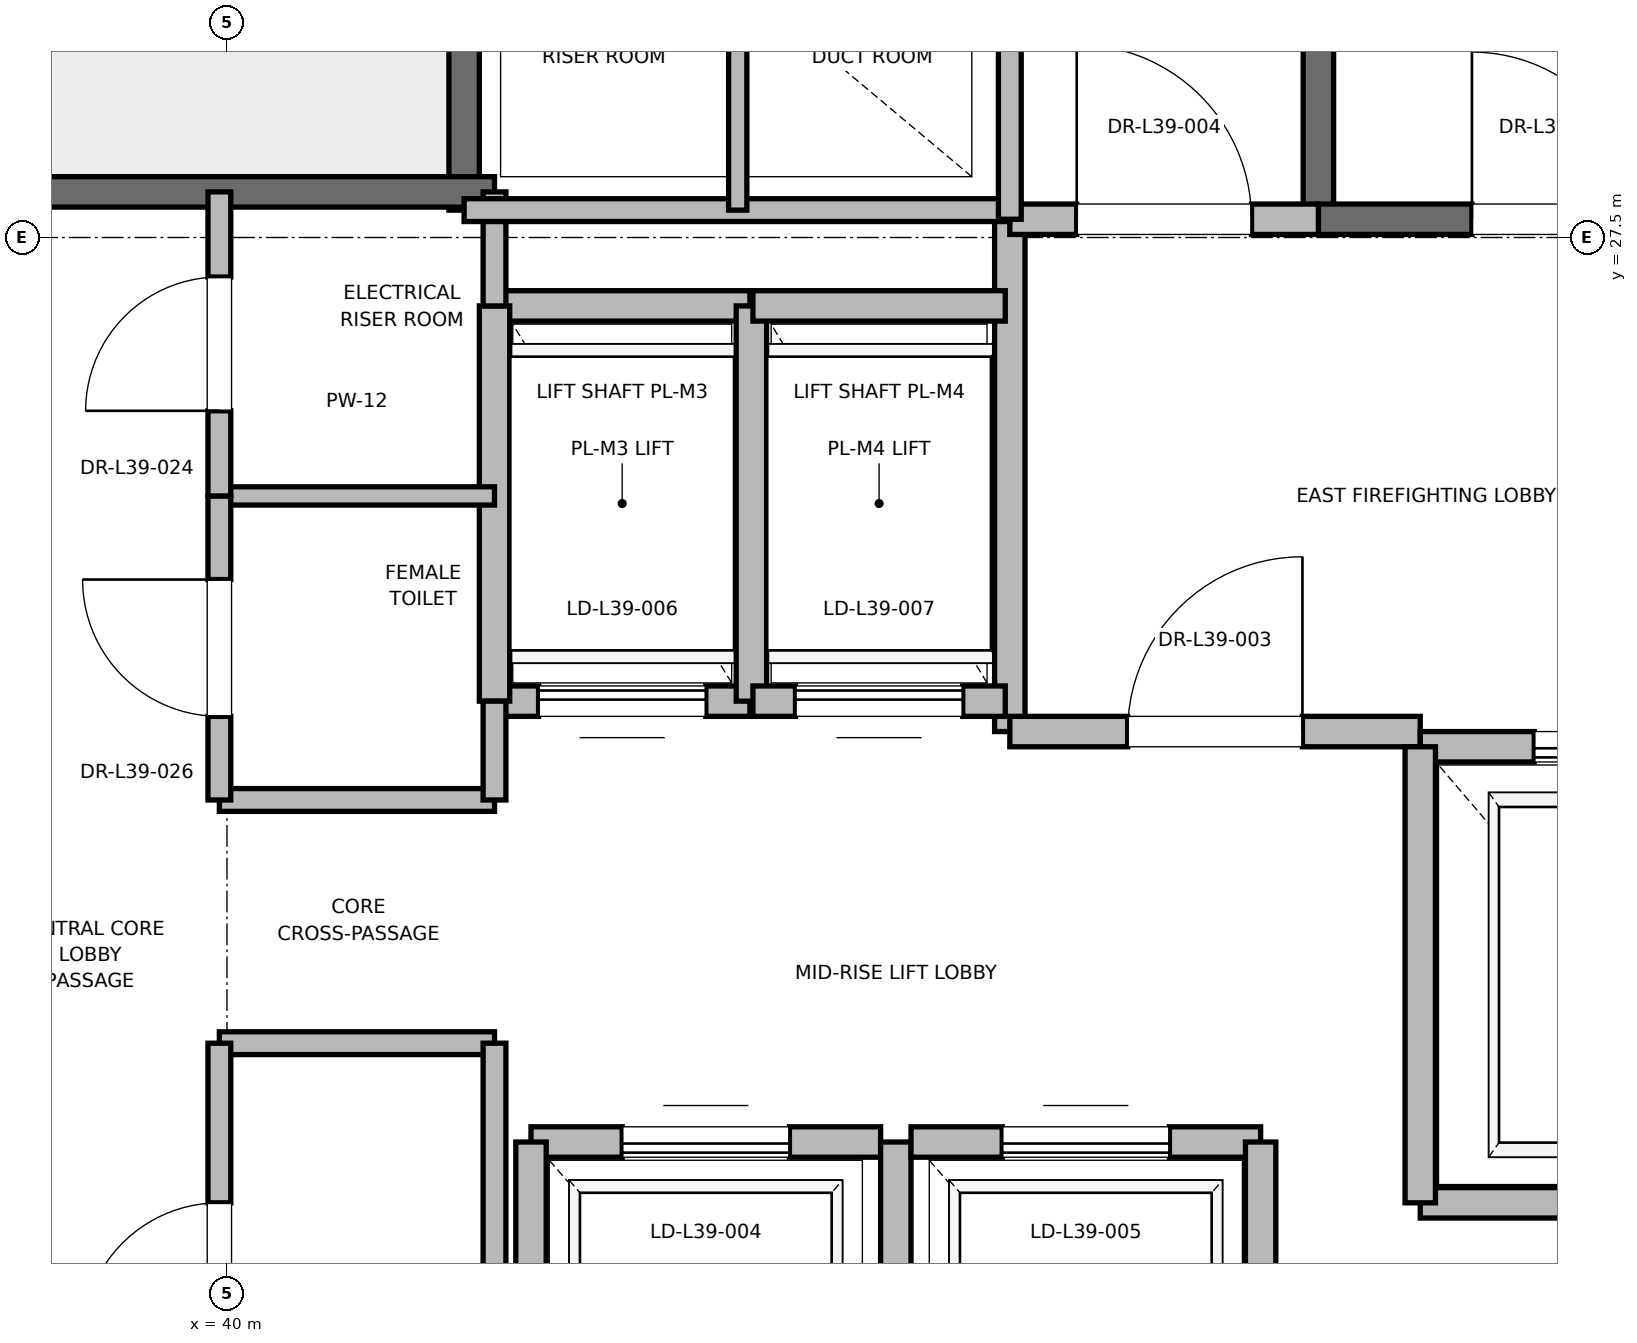
"""IFC4 building model, lengths in metres.
Left out: names, types, materials, properties, quantities, classifications, styles, units other than length and angle.
Written with IfcOpenShell. Run it as: python <this file> out.ifc"""

import sys

from ifc_helpers import new_model, si_unit, direction, frame, frame_2d, origin, place, context, subcontext, project, spatial, rectangle, extrude, element, fill, save


model = new_model("IFC4")
c1 = context("Model", 3, precision=1e-05, world=origin(), true_north=direction((0.0, 1.0)))
c2 = subcontext(c1, "Body", "Model", "MODEL_VIEW")
j1 = project(units=[si_unit("LENGTHUNIT", "METRE"), si_unit("PLANEANGLEUNIT", "RADIAN")], contexts=[c1])
p1 = place(None, origin())
s1 = spatial("IfcSite", under=j1, at=p1, CompositionType="ELEMENT")
p2 = place(p1, origin())
s2 = spatial("IfcBuilding", under=s1, at=p2, CompositionType="ELEMENT")
p3 = place(p2, frame((0.0, 0.0, 168.4)))
s3 = spatial("IfcBuildingStorey", under=s2, at=p3, CompositionType="ELEMENT", Elevation=168.4)
p4 = place(p3, frame((47.18, 27.62, 0.0), z_axis=(0.0, 0.0, 1.0), x_axis=(0.0, 1.0, 0.0)))
e1 = element("IfcWall", 1, at=p4, inside=s3, PredefinedType="SOLIDWALL", context=c2, shape_type="SweptSolid", body=[
    extrude(rectangle(XDim=8.18, YDim=0.2, at=frame_2d((4.09, 0.0))), origin(), (0.0, 0.0, 1.0), 3.775),
])
p5 = place(p3, frame((47.18, 27.62, 0.0), z_axis=(0.0, 0.0, 1.0), x_axis=(1.0, 0.0, 0.0)))
e2 = element("IfcWall", 2, at=p5, inside=s3, PredefinedType="SOLIDWALL", context=c2, shape_type="SweptSolid", body=[
    extrude(rectangle(XDim=3.12, YDim=0.2, at=frame_2d((1.56, 0.0))), origin(), (0.0, 0.0, 1.0), 3.775),
])
p6 = place(p5, frame((1.01, 0.0, 0.0)))
e3 = element("IfcOpeningElement", 3, at=p6, cuts=e2, PredefinedType="OPENING", context=c2, shape_type="SweptSolid", body=[
    extrude(rectangle(XDim=1.1, YDim=2.15, at=frame_2d((0.55, 1.075))), frame((0.0, 0.1, 0.0), z_axis=(0.0, -1.0, 0.0), x_axis=(1.0, 0.0, 0.0)), (0.0, 0.0, 1.0), 0.2),
])
p7 = place(p3, frame((41.56, 27.68, 0.0), z_axis=(0.0, 0.0, 1.0), x_axis=(0.0, 1.0, 0.0)))
e4 = element("IfcWall", 4, at=p7, inside=s3, PredefinedType="SOLIDWALL", context=c2, shape_type="SweptSolid", body=[
    extrude(rectangle(XDim=8.57, YDim=0.2, at=frame_2d((4.285, 0.0))), origin(), (0.0, 0.0, 1.0), 3.775),
])
p8 = place(p3, frame((38.44, 27.8, 0.0), z_axis=(0.0, 0.0, 1.0), x_axis=(1.0, 0.0, 0.0)))
e5 = element("IfcWall", 5, at=p8, inside=s3, PredefinedType="SOLIDWALL", context=c2, shape_type="SweptSolid", body=[
    extrude(rectangle(XDim=3.32, YDim=0.2, at=frame_2d((1.66, 0.0))), origin(), (0.0, 0.0, 1.0), 3.775),
])
p9 = place(p3, frame((45.15, 24.25, 0.0), z_axis=(0.0, 0.0, 1.0), x_axis=(0.0, 1.0, 0.0)))
e6 = element("IfcWall", 6, at=p9, inside=s3, PredefinedType="PARTITIONING", context=c2, shape_type="SweptSolid", body=[
    extrude(rectangle(XDim=3.37, YDim=0.2, at=frame_2d((1.685, 0.0))), origin(), (0.0, 0.0, 1.0), 3.775),
])
p10 = place(p3, frame((45.15, 24.25, 0.0), z_axis=(0.0, 0.0, 1.0), x_axis=(1.0, 0.0, 0.0)))
e7 = element("IfcWall", 7, at=p10, inside=s3, PredefinedType="PARTITIONING", context=c2, shape_type="SweptSolid", body=[
    extrude(rectangle(XDim=2.7, YDim=0.2, at=frame_2d((1.35, 0.0))), origin(), (0.0, 0.0, 1.0), 3.775),
])
p11 = place(p10, frame((0.775, 0.0, 0.0)))
e8 = element("IfcOpeningElement", 8, at=p11, cuts=e7, PredefinedType="OPENING", context=c2, shape_type="SweptSolid", body=[
    extrude(rectangle(XDim=1.15, YDim=2.2, at=frame_2d((0.575, 1.1))), frame((0.0, 0.1, 0.0), z_axis=(0.0, -1.0, 0.0), x_axis=(1.0, 0.0, 0.0)), (0.0, 0.0, 1.0), 0.2),
])
p12 = place(p3, frame((45.15, 27.62, 0.0), z_axis=(0.0, 0.0, 1.0), x_axis=(1.0, 0.0, 0.0)))
e9 = element("IfcWall", 9, at=p12, inside=s3, PredefinedType="PARTITIONING", context=c2, shape_type="SweptSolid", body=[
    extrude(rectangle(XDim=2.03, YDim=0.2, at=frame_2d((1.015, 0.0))), origin(), (0.0, 0.0, 1.0), 3.775),
])
p13 = place(p12, frame((0.44, 0.0, 0.0)))
e10 = element("IfcOpeningElement", 10, at=p13, cuts=e9, PredefinedType="OPENING", context=c2, shape_type="SweptSolid", body=[
    extrude(rectangle(XDim=1.15, YDim=2.2, at=frame_2d((0.575, 1.1))), frame((0.0, 0.1, 0.0), z_axis=(0.0, -1.0, 0.0), x_axis=(1.0, 0.0, 0.0)), (0.0, 0.0, 1.0), 0.2),
])
p14 = place(p3, frame((47.85, 21.15, 0.0), z_axis=(0.0, 0.0, 1.0), x_axis=(1.0, 0.0, 0.0)))
e11 = element("IfcWall", 11, at=p14, inside=s3, PredefinedType="SOLIDWALL", context=c2, shape_type="SweptSolid", body=[
    extrude(rectangle(XDim=2.6, YDim=0.2, at=frame_2d((1.3, 0.0))), origin(), (0.0, 0.0, 1.0), 3.775),
])
p15 = place(p3, frame((50.45, 24.15, 0.0), z_axis=(0.0, 0.0, 1.0), x_axis=(-1.0, 0.0, 0.0)))
e12 = element("IfcWall", 12, at=p15, inside=s3, PredefinedType="SOLIDWALL", context=c2, shape_type="SweptSolid", body=[
    extrude(rectangle(XDim=2.6, YDim=0.2, at=frame_2d((1.3, 0.0))), origin(), (0.0, 0.0, 1.0), 2.755),
])
p16 = place(p15, frame((0.75, 0.0, 0.0)))
e13 = element("IfcOpeningElement", 13, at=p16, cuts=e12, PredefinedType="OPENING", context=c2, shape_type="SweptSolid", body=[
    extrude(rectangle(XDim=1.1, YDim=2.2, at=frame_2d((0.55, 1.1))), frame((0.0, 0.1, 0.0), z_axis=(0.0, -1.0, 0.0), x_axis=(1.0, 0.0, 0.0)), (0.0, 0.0, 1.0), 0.2),
])
p17 = place(p3, frame((47.85, 24.15, 0.0), z_axis=(0.0, 0.0, 1.0), x_axis=(0.0, -1.0, 0.0)))
e14 = element("IfcWall", 14, at=p17, inside=s3, PredefinedType="SOLIDWALL", context=c2, shape_type="SweptSolid", body=[
    extrude(rectangle(XDim=3.0, YDim=0.2, at=frame_2d((1.5, 0.0))), origin(), (0.0, 0.0, 1.0), 3.775),
])
p18 = place(p3, frame((44.3, 21.55, 0.0), z_axis=(0.0, 0.0, 1.0), x_axis=(-1.0, 0.0, 0.0)))
e15 = element("IfcWall", 15, at=p18, inside=s3, PredefinedType="SOLIDWALL", context=c2, shape_type="SweptSolid", body=[
    extrude(rectangle(XDim=2.3, YDim=0.2, at=frame_2d((1.15, 0.0))), origin(), (0.0, 0.0, 1.0), 3.775),
])
p19 = place(p18, frame((0.6, 0.0, 0.0)))
e16 = element("IfcOpeningElement", 16, at=p19, cuts=e15, PredefinedType="OPENING", context=c2, shape_type="SweptSolid", body=[
    extrude(rectangle(XDim=1.1, YDim=2.2, at=frame_2d((0.55, 1.1))), frame((0.0, 0.1, 0.0), z_axis=(0.0, -1.0, 0.0), x_axis=(1.0, 0.0, 0.0)), (0.0, 0.0, 1.0), 0.2),
])
p20 = place(p3, frame((42.0, 21.55, 0.0), z_axis=(0.0, 0.0, 1.0), x_axis=(0.0, -1.0, 0.0)))
e17 = element("IfcWall", 17, at=p20, inside=s3, PredefinedType="SOLIDWALL", context=c2, shape_type="SweptSolid", body=[
    extrude(rectangle(XDim=2.6, YDim=0.2, at=frame_2d((1.3, 0.0))), origin(), (0.0, 0.0, 1.0), 2.755),
])
p21 = place(p3, frame((44.4, 18.95, 0.0), z_axis=(0.0, 0.0, 1.0), x_axis=(0.0, 1.0, 0.0)))
e18 = element("IfcWall", 18, at=p21, inside=s3, PredefinedType="SOLIDWALL", context=c2, shape_type="SweptSolid", body=[
    extrude(rectangle(XDim=2.6, YDim=0.2, at=frame_2d((1.3, 0.0))), origin(), (0.0, 0.0, 1.0), 3.775),
])
p22 = place(p3, frame((46.8, 21.55, 0.0), z_axis=(0.0, 0.0, 1.0), x_axis=(-1.0, 0.0, 0.0)))
e19 = element("IfcWall", 19, at=p22, inside=s3, PredefinedType="SOLIDWALL", context=c2, shape_type="SweptSolid", body=[
    extrude(rectangle(XDim=2.3, YDim=0.2, at=frame_2d((1.15, 0.0))), origin(), (0.0, 0.0, 1.0), 3.775),
])
p23 = place(p22, frame((0.6, 0.0, 0.0)))
e20 = element("IfcOpeningElement", 20, at=p23, cuts=e19, PredefinedType="OPENING", context=c2, shape_type="SweptSolid", body=[
    extrude(rectangle(XDim=1.1, YDim=2.2, at=frame_2d((0.55, 1.1))), frame((0.0, 0.1, 0.0), z_axis=(0.0, -1.0, 0.0), x_axis=(1.0, 0.0, 0.0)), (0.0, 0.0, 1.0), 0.2),
])
p24 = place(p3, frame((46.8, 18.95, 0.0), z_axis=(0.0, 0.0, 1.0), x_axis=(0.0, 1.0, 0.0)))
e21 = element("IfcWall", 21, at=p24, inside=s3, PredefinedType="SOLIDWALL", context=c2, shape_type="SweptSolid", body=[
    extrude(rectangle(XDim=2.6, YDim=0.2, at=frame_2d((1.3, 0.0))), origin(), (0.0, 0.0, 1.0), 3.775),
])
p25 = place(p3, frame((41.76, 24.45, 0.0), z_axis=(0.0, 0.0, 1.0), x_axis=(1.0, 0.0, 0.0)))
e22 = element("IfcWall", 22, at=p25, inside=s3, PredefinedType="SOLIDWALL", context=c2, shape_type="SweptSolid", body=[
    extrude(rectangle(XDim=1.68, YDim=0.2, at=frame_2d((0.84, 0.0))), origin(), (0.0, 0.0, 1.0), 3.775),
])
p26 = place(p25, frame((0.29, 0.0, 0.0)))
e23 = element("IfcOpeningElement", 23, at=p26, cuts=e22, PredefinedType="OPENING", context=c2, shape_type="SweptSolid", body=[
    extrude(rectangle(XDim=1.1, YDim=2.2, at=frame_2d((0.55, 1.1))), frame((0.0, 0.1, 0.0), z_axis=(0.0, -1.0, 0.0), x_axis=(1.0, 0.0, 0.0)), (0.0, 0.0, 1.0), 0.2),
])
p27 = place(p3, frame((43.44, 27.05, 0.0), z_axis=(0.0, 0.0, 1.0), x_axis=(-1.0, 0.0, 0.0)))
e24 = element("IfcWall", 24, at=p27, inside=s3, PredefinedType="SOLIDWALL", context=c2, shape_type="SweptSolid", body=[
    extrude(rectangle(XDim=1.68, YDim=0.2, at=frame_2d((0.84, 0.0))), origin(), (0.0, 0.0, 1.0), 3.775),
])
for number, where, z_axis, x_axis in (
    (25, (41.76, 27.05, 0.0), (0.0, 0.0, 1.0), (0.0, -1.0, 0.0)),
    (26, (43.45, 24.45, 0.0), (0.0, 0.0, 1.0), (0.0, 1.0, 0.0)),
):
    element("IfcWall", number, at=place(p3, frame(where, z_axis=z_axis, x_axis=x_axis)), inside=s3, PredefinedType="SOLIDWALL", context=c2, shape_type="SweptSolid", body=[
        extrude(rectangle(XDim=2.6, YDim=0.2, at=frame_2d((1.3, 0.0))), origin(), (0.0, 0.0, 1.0), 3.775),
    ])
p28 = place(p3, frame((43.46, 24.45, 0.0), z_axis=(0.0, 0.0, 1.0), x_axis=(1.0, 0.0, 0.0)))
e27 = element("IfcWall", 27, at=p28, inside=s3, PredefinedType="SOLIDWALL", context=c2, shape_type="SweptSolid", body=[
    extrude(rectangle(XDim=1.66, YDim=0.2, at=frame_2d((0.83, 0.0))), origin(), (0.0, 0.0, 1.0), 3.775),
])
p29 = place(p28, frame((0.28, 0.0, 0.0)))
e28 = element("IfcOpeningElement", 28, at=p29, cuts=e27, PredefinedType="OPENING", context=c2, shape_type="SweptSolid", body=[
    extrude(rectangle(XDim=1.1, YDim=2.2, at=frame_2d((0.55, 1.1))), frame((0.0, 0.1, 0.0), z_axis=(0.0, -1.0, 0.0), x_axis=(1.0, 0.0, 0.0)), (0.0, 0.0, 1.0), 0.2),
])
p30 = place(p3, frame((45.12, 27.05, 0.0), z_axis=(0.0, 0.0, 1.0), x_axis=(-1.0, 0.0, 0.0)))
e29 = element("IfcWall", 29, at=p30, inside=s3, PredefinedType="SOLIDWALL", context=c2, shape_type="SweptSolid", body=[
    extrude(rectangle(XDim=1.66, YDim=0.2, at=frame_2d((0.83, 0.0))), origin(), (0.0, 0.0, 1.0), 3.775),
])
for number, where, z_axis, x_axis in (
    (30, (39.95, 22.2, 0.0), (0.0, 0.0, 1.0), (1.0, 0.0, 0.0)),
    (31, (39.95, 23.8, 0.0), (0.0, 0.0, 1.0), (1.0, 0.0, 0.0)),
):
    element("IfcWall", number, at=place(p3, frame(where, z_axis=z_axis, x_axis=x_axis)), inside=s3, PredefinedType="PARTITIONING", context=c2, shape_type="SweptSolid", body=[
        extrude(rectangle(XDim=1.81, YDim=0.15, at=frame_2d((0.905, 0.0))), origin(), (0.0, 0.0, 1.0), 2.85),
    ])
p31 = place(p3, frame((39.95, 25.8, 0.0), z_axis=(0.0, 0.0, 1.0), x_axis=(1.0, 0.0, 0.0)))
e32 = element("IfcWall", 32, at=p31, inside=s3, PredefinedType="PARTITIONING", context=c2, shape_type="SweptSolid", body=[
    extrude(rectangle(XDim=1.81, YDim=0.12, at=frame_2d((0.905, 0.0))), origin(), (0.0, 0.0, 1.0), 2.85),
])
p32 = place(p3, frame((41.76, 18.6, 0.0), z_axis=(0.0, 0.0, 1.0), x_axis=(0.0, 1.0, 0.0)))
e33 = element("IfcWall", 33, at=p32, inside=s3, PredefinedType="PARTITIONING", context=c2, shape_type="SweptSolid", body=[
    extrude(rectangle(XDim=3.6, YDim=0.15, at=frame_2d((1.8, 0.0))), origin(), (0.0, 0.0, 1.0), 2.755),
])
p33 = place(p3, frame((41.76, 23.8, 0.0), z_axis=(0.0, 0.0, 1.0), x_axis=(0.0, 1.0, 0.0)))
e34 = element("IfcWall", 34, at=p33, inside=s3, PredefinedType="PARTITIONING", context=c2, shape_type="SweptSolid", body=[
    extrude(rectangle(XDim=0.65, YDim=0.15, at=frame_2d((0.325, 0.0))), origin(), (0.0, 0.0, 1.0), 2.85),
])
p34 = place(p3, frame((41.76, 27.05, 0.0), z_axis=(0.0, 0.0, 1.0), x_axis=(0.0, 1.0, 0.0)))
e35 = element("IfcWall", 35, at=p34, inside=s3, PredefinedType="PARTITIONING", context=c2, shape_type="SweptSolid", body=[
    extrude(rectangle(XDim=0.75, YDim=0.15, at=frame_2d((0.375, 0.0))), origin(), (0.0, 0.0, 1.0), 2.85),
])
p35 = place(p3, frame((39.95, 19.2, 0.0), z_axis=(0.0, 0.0, 1.0), x_axis=(0.0, 1.0, 0.0)))
e36 = element("IfcWall", 36, at=p35, inside=s3, PredefinedType="PARTITIONING", context=c2, shape_type="SweptSolid", body=[
    extrude(rectangle(XDim=3.0, YDim=0.15, at=frame_2d((1.5, 0.0))), origin(), (0.0, 0.0, 1.0), 2.85),
])
p36 = place(p35, frame((1.05, 0.0, 0.0)))
e37 = element("IfcOpeningElement", 37, at=p36, cuts=e36, PredefinedType="OPENING", context=c2, shape_type="SweptSolid", body=[
    extrude(rectangle(XDim=0.9, YDim=2.1, at=frame_2d((0.45, 1.05))), frame((0.0, 0.075, 0.0), z_axis=(0.0, -1.0, 0.0), x_axis=(1.0, 0.0, 0.0)), (0.0, 0.0, 1.0), 0.15),
])
p37 = place(p3, frame((39.95, 23.8, 0.0), z_axis=(0.0, 0.0, 1.0), x_axis=(0.0, 1.0, 0.0)))
e38 = element("IfcWall", 38, at=p37, inside=s3, PredefinedType="PARTITIONING", context=c2, shape_type="SweptSolid", body=[
    extrude(rectangle(XDim=2.0, YDim=0.15, at=frame_2d((1.0, 0.0))), origin(), (0.0, 0.0, 1.0), 2.85),
])
p38 = place(p37, frame((0.55, 0.0, 0.0)))
e39 = element("IfcOpeningElement", 39, at=p38, cuts=e38, PredefinedType="OPENING", context=c2, shape_type="SweptSolid", body=[
    extrude(rectangle(XDim=0.9, YDim=2.1, at=frame_2d((0.45, 1.05))), frame((0.0, 0.075, 0.0), z_axis=(0.0, -1.0, 0.0), x_axis=(1.0, 0.0, 0.0)), (0.0, 0.0, 1.0), 0.15),
])
p39 = place(p3, frame((39.95, 25.8, 0.0), z_axis=(0.0, 0.0, 1.0), x_axis=(0.0, 1.0, 0.0)))
e40 = element("IfcWall", 40, at=p39, inside=s3, PredefinedType="PARTITIONING", context=c2, shape_type="SweptSolid", body=[
    extrude(rectangle(XDim=2.0, YDim=0.15, at=frame_2d((1.0, 0.0))), origin(), (0.0, 0.0, 1.0), 2.85),
])
p40 = place(p39, frame((0.56, 0.0, 0.0)))
e41 = element("IfcOpeningElement", 41, at=p40, cuts=e40, PredefinedType="OPENING", context=c2, shape_type="SweptSolid", body=[
    extrude(rectangle(XDim=0.88, YDim=2.1, at=frame_2d((0.44, 1.05))), frame((0.0, 0.075, 0.0), z_axis=(0.0, -1.0, 0.0), x_axis=(1.0, 0.0, 0.0)), (0.0, 0.0, 1.0), 0.15),
])
p41 = place(p3, frame((41.56, 27.68, 0.0), z_axis=(0.0, 0.0, 1.0), x_axis=(1.0, 0.0, 0.0)))
e42 = element("IfcWall", 42, at=p41, inside=s3, PredefinedType="PARTITIONING", context=c2, shape_type="SweptSolid", body=[
    extrude(rectangle(XDim=3.59, YDim=0.15, at=frame_2d((1.795, 0.0))), origin(), (0.0, 0.0, 1.0), 2.85),
])
p42 = place(p3, frame((45.15, 27.62, 0.0), z_axis=(0.0, 0.0, 1.0), x_axis=(0.0, 1.0, 0.0)))
e43 = element("IfcWall", 43, at=p42, inside=s3, PredefinedType="PARTITIONING", context=c2, shape_type="SweptSolid", body=[
    extrude(rectangle(XDim=3.1, YDim=0.15, at=frame_2d((1.55, 0.0))), origin(), (0.0, 0.0, 1.0), 2.85),
])
p43 = place(p3, frame((43.36, 27.68, 0.0), z_axis=(0.0, 0.0, 1.0), x_axis=(0.0, 1.0, 0.0)))
e44 = element("IfcWall", 44, at=p43, inside=s3, PredefinedType="PARTITIONING", context=c2, shape_type="SweptSolid", body=[
    extrude(rectangle(XDim=3.04, YDim=0.12, at=frame_2d((1.52, 0.0))), origin(), (0.0, 0.0, 1.0), 2.85),
])
p44 = place(p6, origin())
e45 = element("IfcDoor", 45, at=p44, inside=s3, OperationType="SINGLE_SWING_LEFT", PredefinedType="DOOR", context=c2, shape_type="SweptSolid", body=[
    extrude(rectangle(XDim=1.1, YDim=2.15, at=frame_2d((0.55, 1.075))), frame((0.0, 0.025, 0.0), z_axis=(0.0, -1.0, 0.0), x_axis=(1.0, 0.0, 0.0)), (0.0, 0.0, 1.0), 0.05),
])
fill(e3, e45)
p45 = place(p11, origin())
e46 = element("IfcDoor", 46, at=p45, inside=s3, OperationType="SINGLE_SWING_RIGHT", PredefinedType="DOOR", context=c2, shape_type="SweptSolid", body=[
    extrude(rectangle(XDim=1.15, YDim=2.2, at=frame_2d((0.575, 1.1))), frame((0.0, 0.025, 0.0), z_axis=(0.0, -1.0, 0.0), x_axis=(1.0, 0.0, 0.0)), (0.0, 0.0, 1.0), 0.05),
])
fill(e8, e46)
p46 = place(p13, origin())
e47 = element("IfcDoor", 47, at=p46, inside=s3, OperationType="SINGLE_SWING_LEFT", PredefinedType="DOOR", context=c2, shape_type="SweptSolid", body=[
    extrude(rectangle(XDim=1.15, YDim=2.2, at=frame_2d((0.575, 1.1))), frame((0.0, 0.025, 0.0), z_axis=(0.0, -1.0, 0.0), x_axis=(1.0, 0.0, 0.0)), (0.0, 0.0, 1.0), 0.05),
])
fill(e10, e47)
p47 = place(p16, origin())
e48 = element("IfcDoor", 48, at=p47, inside=s3, OperationType="SLIDING_TO_RIGHT", PredefinedType="DOOR", context=c2, shape_type="SweptSolid", body=[
    extrude(rectangle(XDim=1.1, YDim=2.2, at=frame_2d((0.55, 1.1))), frame((0.0, 0.025, 0.0), z_axis=(0.0, -1.0, 0.0), x_axis=(1.0, 0.0, 0.0)), (0.0, 0.0, 1.0), 0.05),
])
fill(e13, e48)
p48 = place(p19, origin())
e49 = element("IfcDoor", 49, at=p48, inside=s3, OperationType="SLIDING_TO_RIGHT", PredefinedType="DOOR", context=c2, shape_type="SweptSolid", body=[
    extrude(rectangle(XDim=1.1, YDim=2.2, at=frame_2d((0.55, 1.1))), frame((0.0, 0.025, 0.0), z_axis=(0.0, -1.0, 0.0), x_axis=(1.0, 0.0, 0.0)), (0.0, 0.0, 1.0), 0.05),
])
fill(e16, e49)
p49 = place(p23, origin())
e50 = element("IfcDoor", 50, at=p49, inside=s3, OperationType="SLIDING_TO_RIGHT", PredefinedType="DOOR", context=c2, shape_type="SweptSolid", body=[
    extrude(rectangle(XDim=1.1, YDim=2.2, at=frame_2d((0.55, 1.1))), frame((0.0, 0.025, 0.0), z_axis=(0.0, -1.0, 0.0), x_axis=(1.0, 0.0, 0.0)), (0.0, 0.0, 1.0), 0.05),
])
fill(e20, e50)
p50 = place(p26, origin())
e51 = element("IfcDoor", 51, at=p50, inside=s3, OperationType="SLIDING_TO_RIGHT", PredefinedType="DOOR", context=c2, shape_type="SweptSolid", body=[
    extrude(rectangle(XDim=1.1, YDim=2.2, at=frame_2d((0.55, 1.1))), frame((0.0, 0.025, 0.0), z_axis=(0.0, -1.0, 0.0), x_axis=(1.0, 0.0, 0.0)), (0.0, 0.0, 1.0), 0.05),
])
fill(e23, e51)
p51 = place(p29, origin())
e52 = element("IfcDoor", 52, at=p51, inside=s3, OperationType="SLIDING_TO_RIGHT", PredefinedType="DOOR", context=c2, shape_type="SweptSolid", body=[
    extrude(rectangle(XDim=1.1, YDim=2.2, at=frame_2d((0.55, 1.1))), frame((0.0, 0.025, 0.0), z_axis=(0.0, -1.0, 0.0), x_axis=(1.0, 0.0, 0.0)), (0.0, 0.0, 1.0), 0.05),
])
fill(e28, e52)
p52 = place(p36, origin())
e53 = element("IfcDoor", 53, at=p52, inside=s3, OperationType="SINGLE_SWING_LEFT", PredefinedType="DOOR", context=c2, shape_type="SweptSolid", body=[
    extrude(rectangle(XDim=0.9, YDim=2.1, at=frame_2d((0.45, 1.05))), frame((0.0, 0.025, 0.0), z_axis=(0.0, -1.0, 0.0), x_axis=(1.0, 0.0, 0.0)), (0.0, 0.0, 1.0), 0.05),
])
fill(e37, e53)
p53 = place(p38, origin())
e54 = element("IfcDoor", 54, at=p53, inside=s3, OperationType="SINGLE_SWING_RIGHT", PredefinedType="DOOR", context=c2, shape_type="SweptSolid", body=[
    extrude(rectangle(XDim=0.9, YDim=2.1, at=frame_2d((0.45, 1.05))), frame((0.0, 0.025, 0.0), z_axis=(0.0, -1.0, 0.0), x_axis=(1.0, 0.0, 0.0)), (0.0, 0.0, 1.0), 0.05),
])
fill(e39, e54)
p54 = place(p40, origin())
e55 = element("IfcDoor", 55, at=p54, inside=s3, OperationType="SINGLE_SWING_LEFT", PredefinedType="DOOR", context=c2, shape_type="SweptSolid", body=[
    extrude(rectangle(XDim=0.88, YDim=2.1, at=frame_2d((0.44, 1.05))), frame((0.0, 0.025, 0.0), z_axis=(0.0, -1.0, 0.0), x_axis=(1.0, 0.0, 0.0)), (0.0, 0.0, 1.0), 0.05),
])
fill(e41, e55)
save(model, sys.argv[1])
